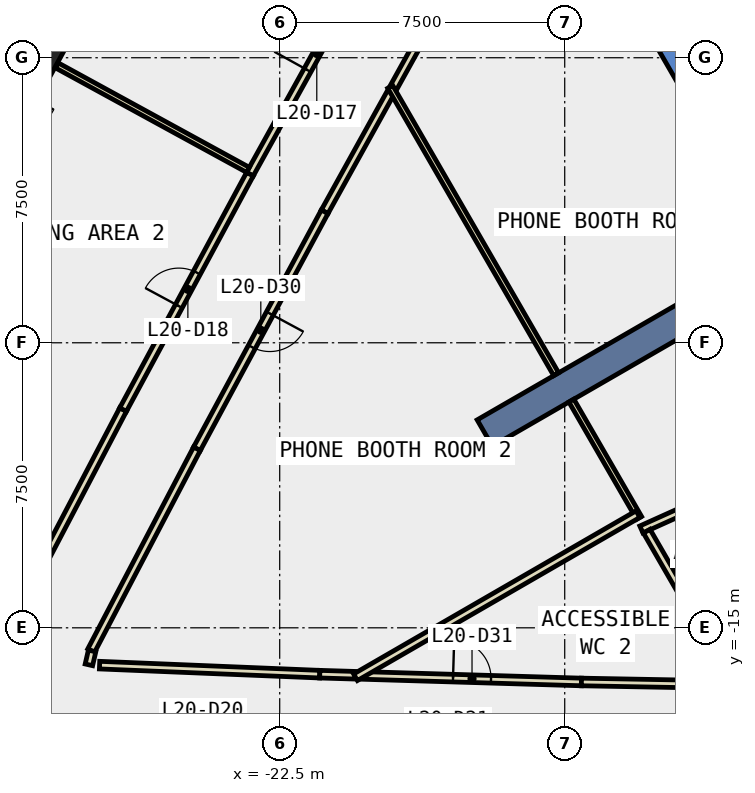
"""IFC4 building model, lengths in metres.
Left out: names, types, materials, properties, quantities, classifications, styles, units other than length and angle.
Written with IfcOpenShell. Run it as: python <this file> out.ifc"""

import sys

from ifc_helpers import new_model, si_unit, direction, frame, frame_2d, origin, origin_2d, place, context, subcontext, project, spatial, polyline, rectangle, outline, extrude, element, fill, save


model = new_model("IFC4")
c1 = context("Model", 3, precision=1e-05, world=origin(), true_north=direction((0.0, 1.0)))
c2 = subcontext(c1, "Body", "Model", "MODEL_VIEW")
j1 = project(units=[si_unit("LENGTHUNIT", "METRE"), si_unit("PLANEANGLEUNIT", "RADIAN")], contexts=[c1])
p1 = place(None, origin())
s1 = spatial("IfcSite", under=j1, at=p1, CompositionType="ELEMENT")
p2 = place(p1, origin())
s2 = spatial("IfcBuilding", under=s1, at=p2, CompositionType="ELEMENT")
p3 = place(p2, frame((0.0, 0.0, 95.0)))
s3 = spatial("IfcBuildingStorey", under=s2, at=p3, CompositionType="ELEMENT", Elevation=95.0)
p4 = place(p3, frame((-29.039, 0.167, -0.4), z_axis=(0.0, 0.0, 1.0), x_axis=(0.479611016922, 0.87748120917, 0.0)))
e1 = element("IfcColumn", 1, at=p4, inside=s3, PredefinedType="COLUMN", context=c2, shape_type="SweptSolid", body=[
    extrude(rectangle(XDim=1.1, YDim=1.5, at=origin_2d()), origin(), (0.0, 0.0, 1.0), 4.2),
])
p5 = place(p3, frame((0.0, 0.0, -0.4)))
e2 = element("IfcWall", 2, at=p5, inside=s3, PredefinedType="SHEAR", context=c2, shape_type="SweptSolid", body=[
    extrude(outline(polyline([(-13.856, 2.5), (-6.928, -9.5), (-6.409, -8.6), (-12.817, 2.5), (-13.856, 2.5)])), origin(), (0.0, 0.0, 1.0), 4.2),
])
p6 = place(p3, frame((-9.31, -5.375, -0.4), z_axis=(0.0, 0.0, 1.0), x_axis=(-0.866017533419, -0.500013631625, 0.0)))
e3 = element("IfcWall", 3, at=p6, inside=s3, PredefinedType="SHEAR", context=c2, shape_type="SweptSolid", body=[
    extrude(rectangle(XDim=9.0, YDim=0.8, at=frame_2d((4.5, 0.0))), origin(), (0.0, 0.0, 1.0), 4.2),
])
p7 = place(p3, frame((-17.883, 2.143, 0.0), z_axis=(0.0, 0.0, 1.0), x_axis=(-0.484695523805, -0.874682942101, 0.0)))
e4 = element("IfcWall", 4, at=p7, inside=s3, PredefinedType="PARTITIONING", context=c2, shape_type="SweptSolid", body=[
    extrude(rectangle(XDim=3.349, YDim=0.2, at=frame_2d((1.674, 0.0))), origin(), (0.0, 0.0, 1.0), 3.8),
])
p8 = place(p3, frame((-19.579, -0.917, 0.0), z_axis=(0.0, 0.0, 1.0), x_axis=(-0.484700239797, -0.874680328772, 0.0)))
e5 = element("IfcWall", 5, at=p8, inside=s3, PredefinedType="PARTITIONING", context=c2, shape_type="SweptSolid", body=[
    extrude(rectangle(XDim=3.585, YDim=0.2, at=frame_2d((1.792, 0.0))), origin(), (0.0, 0.0, 1.0), 3.8),
])
p9 = place(p3, frame((-21.317, -4.053, 0.0), z_axis=(0.0, 0.0, 1.0), x_axis=(-0.474391588657, -0.880313932987, 0.0)))
e6 = element("IfcWall", 6, at=p9, inside=s3, PredefinedType="PARTITIONING", context=c2, shape_type="SweptSolid", body=[
    extrude(rectangle(XDim=7.085, YDim=0.2, at=frame_2d((3.542, 0.0))), origin(), (0.0, 0.0, 1.0), 3.8),
])
p10 = place(p9, frame((3.042, 0.0, 0.0)))
e7 = element("IfcOpeningElement", 7, at=p10, cuts=e6, PredefinedType="OPENING", context=c2, shape_type="SweptSolid", body=[
    extrude(rectangle(XDim=1.0, YDim=2.1, at=frame_2d((0.5, 1.05))), frame((0.0, 0.11, 0.0), z_axis=(0.0, -1.0, 0.0), x_axis=(1.0, 0.0, 0.0)), (0.0, 0.0, 1.0), 0.22),
])
p11 = place(p3, frame((-24.678, -10.29, 0.0), z_axis=(0.0, 0.0, 1.0), x_axis=(-0.464203280494, -0.885728691179, 0.0)))
e8 = element("IfcWall", 8, at=p11, inside=s3, PredefinedType="PARTITIONING", context=c2, shape_type="SweptSolid", body=[
    extrude(rectangle(XDim=5.995, YDim=0.2, at=frame_2d((2.998, 0.0))), origin(), (0.0, 0.0, 1.0), 3.8),
])
p12 = place(p3, frame((-27.437, -15.609, 0.0), z_axis=(0.0, 0.0, 1.0), x_axis=(-0.224098195188, -0.97456656977, 0.0)))
e9 = element("IfcWall", 9, at=p12, inside=s3, PredefinedType="PARTITIONING", context=c2, shape_type="SweptSolid", body=[
    extrude(rectangle(XDim=0.375, YDim=0.2, at=frame_2d((0.188, 0.0))), origin(), (0.0, 0.0, 1.0), 3.8),
])
p13 = place(p3, frame((-27.24, -15.982, 0.0), z_axis=(0.0, 0.0, 1.0), x_axis=(0.999157128819, -0.041049140426, 0.0)))
e10 = element("IfcWall", 10, at=p13, inside=s3, PredefinedType="PARTITIONING", context=c2, shape_type="SweptSolid", body=[
    extrude(rectangle(XDim=5.799, YDim=0.2, at=frame_2d((2.899, 0.0))), origin(), (0.0, 0.0, 1.0), 3.8),
])
p14 = place(p3, frame((-21.446, -16.22, 0.0), z_axis=(0.0, 0.0, 1.0), x_axis=(0.999542625536, -0.030241358047, 0.0)))
e11 = element("IfcWall", 11, at=p14, inside=s3, PredefinedType="PARTITIONING", context=c2, shape_type="SweptSolid", body=[
    extrude(rectangle(XDim=0.928, YDim=0.2, at=frame_2d((0.464, 0.0))), origin(), (0.0, 0.0, 1.0), 3.8),
])
p15 = place(p3, frame((-20.318, -16.253, 0.0), z_axis=(0.0, 0.0, 1.0), x_axis=(0.999553385537, -0.029883598524, 0.0)))
e12 = element("IfcWall", 12, at=p15, inside=s3, PredefinedType="PARTITIONING", context=c2, shape_type="SweptSolid", body=[
    extrude(rectangle(XDim=5.76, YDim=0.2, at=frame_2d((2.88, 0.0))), origin(), (0.0, 0.0, 1.0), 3.8),
])
p16 = place(p15, frame((2.38, 0.0, 0.0)))
e13 = element("IfcOpeningElement", 13, at=p16, cuts=e12, PredefinedType="OPENING", context=c2, shape_type="SweptSolid", body=[
    extrude(rectangle(XDim=1.0, YDim=2.1, at=frame_2d((0.5, 1.05))), frame((0.0, 0.11, 0.0), z_axis=(0.0, -1.0, 0.0), x_axis=(1.0, 0.0, 0.0)), (0.0, 0.0, 1.0), 0.22),
])
p17 = place(p3, frame((-14.561, -16.425, 0.0), z_axis=(0.0, 0.0, 1.0), x_axis=(0.999829548691, -0.018462761553, 0.0)))
e14 = element("IfcWall", 14, at=p17, inside=s3, PredefinedType="PARTITIONING", context=c2, shape_type="SweptSolid", body=[
    extrude(rectangle(XDim=3.954, YDim=0.2, at=frame_2d((1.977, 0.0))), origin(), (0.0, 0.0, 1.0), 3.8),
])
p18 = place(p3, frame((-23.284, -3.064, 0.0), z_axis=(0.0, 0.0, 1.0), x_axis=(0.48478560119, 0.874633020689, 0.0)))
e15 = element("IfcWall", 15, at=p18, inside=s3, PredefinedType="PARTITIONING", context=c2, shape_type="SweptSolid", body=[
    extrude(rectangle(XDim=7.11, YDim=0.2, at=frame_2d((3.555, 0.0))), origin(), (0.0, 0.0, 1.0), 3.8),
])
p19 = place(p18, frame((3.13, 0.0, 0.0)))
e16 = element("IfcOpeningElement", 16, at=p19, cuts=e15, PredefinedType="OPENING", context=c2, shape_type="SweptSolid", body=[
    extrude(rectangle(XDim=1.0, YDim=2.1, at=frame_2d((0.5, 1.05))), frame((0.0, 0.11, 0.0), z_axis=(0.0, -1.0, 0.0), x_axis=(1.0, 0.0, 0.0)), (0.0, 0.0, 1.0), 0.22),
])
p20 = place(p3, frame((-29.541, -14.829, 0.0), z_axis=(0.0, 0.0, 1.0), x_axis=(0.46422598759, 0.885716790202, 0.0)))
e17 = element("IfcWall", 17, at=p20, inside=s3, PredefinedType="PARTITIONING", context=c2, shape_type="SweptSolid", body=[
    extrude(rectangle(XDim=6.29, YDim=0.2, at=frame_2d((3.145, 0.0))), origin(), (0.0, 0.0, 1.0), 3.8),
])
p21 = place(p3, frame((-26.621, -9.258, 0.0), z_axis=(0.0, 0.0, 1.0), x_axis=(0.474414295505, 0.880301696136, 0.0)))
e18 = element("IfcWall", 18, at=p21, inside=s3, PredefinedType="PARTITIONING", context=c2, shape_type="SweptSolid", body=[
    extrude(rectangle(XDim=7.036, YDim=0.2, at=frame_2d((3.518, 0.0))), origin(), (0.0, 0.0, 1.0), 3.8),
])
p22 = place(p21, frame((3.093, 0.0, 0.0)))
e19 = element("IfcOpeningElement", 19, at=p22, cuts=e18, PredefinedType="OPENING", context=c2, shape_type="SweptSolid", body=[
    extrude(rectangle(XDim=1.0, YDim=2.1, at=frame_2d((0.5, 1.05))), frame((0.0, 0.11, 0.0), z_axis=(0.0, -1.0, 0.0), x_axis=(1.0, 0.0, 0.0)), (0.0, 0.0, 1.0), 0.22),
])
p23 = place(p3, frame((-7.8, -10.08, 0.0), z_axis=(0.0, 0.0, 1.0), x_axis=(-0.911938383636, -0.410327167577, 0.0)))
e20 = element("IfcWall", 20, at=p23, inside=s3, PredefinedType="PARTITIONING", context=c2, shape_type="SweptSolid", body=[
    extrude(rectangle(XDim=5.683, YDim=0.2, at=frame_2d((2.842, 0.0))), origin(), (0.0, 0.0, 1.0), 3.8),
])
p24 = place(p3, frame((-13.043, -12.108, 0.0), z_axis=(0.0, 0.0, 1.0), x_axis=(-0.499947764329, 0.866055559963, 0.0)))
e21 = element("IfcWall", 21, at=p24, inside=s3, PredefinedType="PARTITIONING", context=c2, shape_type="SweptSolid", body=[
    extrude(rectangle(XDim=3.564, YDim=0.15, at=frame_2d((1.782, 0.0))), origin(), (0.0, 0.0, 1.0), 3.8),
])
p25 = place(p3, frame((-10.458, -16.586, 0.0), z_axis=(0.0, 0.0, 1.0), x_axis=(-0.500121439648, 0.865955279218, 0.0)))
e22 = element("IfcWall", 22, at=p25, inside=s3, PredefinedType="PARTITIONING", context=c2, shape_type="SweptSolid", body=[
    extrude(rectangle(XDim=4.767, YDim=0.2, at=frame_2d((2.383, 0.0))), origin(), (0.0, 0.0, 1.0), 3.8),
])
p26 = place(p3, frame((-13.072, -12.009, 0.0), z_axis=(0.0, 0.0, 1.0), x_axis=(-0.865993734772, -0.500054848326, 0.0)))
e23 = element("IfcWall", 23, at=p26, inside=s3, PredefinedType="PARTITIONING", context=c2, shape_type="SweptSolid", body=[
    extrude(rectangle(XDim=8.583, YDim=0.2, at=frame_2d((4.292, 0.0))), origin(), (0.0, 0.0, 1.0), 3.8),
])
p27 = place(p3, frame((-23.336, -2.95, 0.0), z_axis=(0.0, 0.0, 1.0), x_axis=(-0.877455496162, 0.479658057637, 0.0)))
e24 = element("IfcWall", 24, at=p27, inside=s3, PredefinedType="PARTITIONING", context=c2, shape_type="SweptSolid", body=[
    extrude(rectangle(XDim=5.729, YDim=0.15, at=frame_2d((2.865, 0.0))), origin(), (0.0, 0.0, 1.0), 3.8),
])
p28 = place(p3, frame((-15.225, -8.328, 0.0), z_axis=(0.0, 0.0, 1.0), x_axis=(-0.500038648455, 0.866003088939, 0.0)))
e25 = element("IfcWall", 25, at=p28, inside=s3, PredefinedType="PARTITIONING", context=c2, shape_type="SweptSolid", body=[
    extrude(rectangle(XDim=8.733, YDim=0.15, at=frame_2d((4.367, 0.0))), origin(), (0.0, 0.0, 1.0), 3.8),
])
p29 = place(p19, origin())
e26 = element("IfcDoor", 26, at=p29, inside=s3, OperationType="SINGLE_SWING_LEFT", PredefinedType="DOOR", context=c2, shape_type="SweptSolid", body=[
    extrude(rectangle(XDim=1.0, YDim=2.1, at=frame_2d((0.5, 1.05))), frame((0.0, 0.025, 0.0), z_axis=(0.0, -1.0, 0.0), x_axis=(1.0, 0.0, 0.0)), (0.0, 0.0, 1.0), 0.05),
])
fill(e16, e26)
p30 = place(p22, origin())
e27 = element("IfcDoor", 27, at=p30, inside=s3, OperationType="SINGLE_SWING_LEFT", PredefinedType="DOOR", context=c2, shape_type="SweptSolid", body=[
    extrude(rectangle(XDim=1.0, YDim=2.1, at=frame_2d((0.5, 1.05))), frame((0.0, 0.025, 0.0), z_axis=(0.0, -1.0, 0.0), x_axis=(1.0, 0.0, 0.0)), (0.0, 0.0, 1.0), 0.05),
])
fill(e19, e27)
p31 = place(p10, origin())
e28 = element("IfcDoor", 28, at=p31, inside=s3, OperationType="SINGLE_SWING_RIGHT", PredefinedType="DOOR", context=c2, shape_type="SweptSolid", body=[
    extrude(rectangle(XDim=1.0, YDim=2.1, at=frame_2d((0.5, 1.05))), frame((0.0, 0.025, 0.0), z_axis=(0.0, -1.0, 0.0), x_axis=(1.0, 0.0, 0.0)), (0.0, 0.0, 1.0), 0.05),
])
fill(e7, e28)
p32 = place(p16, origin())
e29 = element("IfcDoor", 29, at=p32, inside=s3, OperationType="SINGLE_SWING_LEFT", PredefinedType="DOOR", context=c2, shape_type="SweptSolid", body=[
    extrude(rectangle(XDim=1.0, YDim=2.1, at=frame_2d((0.5, 1.05))), frame((0.0, 0.025, 0.0), z_axis=(0.0, -1.0, 0.0), x_axis=(1.0, 0.0, 0.0)), (0.0, 0.0, 1.0), 0.05),
])
fill(e13, e29)
save(model, sys.argv[1])
